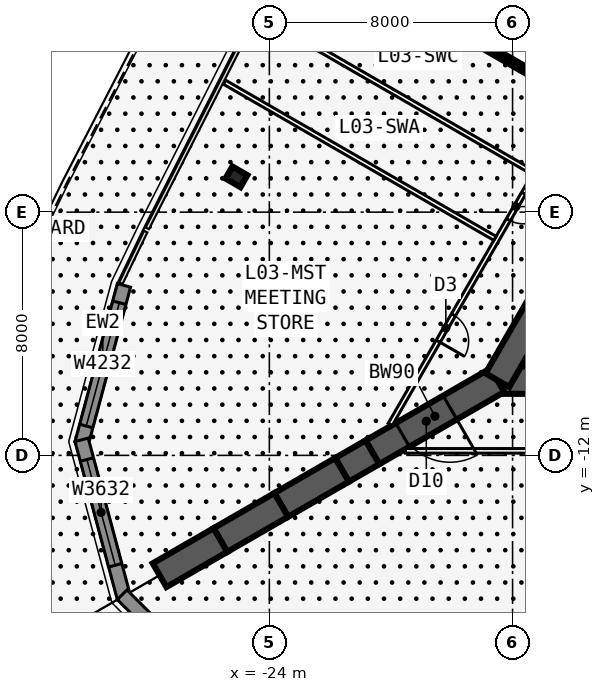
"""IFC4 building model, lengths in metres.
Left out: names, types, materials, properties, quantities, classifications, styles, units other than length and angle.
Written with IfcOpenShell. Run it as: python <this file> out.ifc"""

import sys

from ifc_helpers import new_model, si_unit, direction, frame, frame_2d, origin, origin_2d, place, context, subcontext, project, spatial, rectangle, i_section, extrude, element, fill, save


model = new_model("IFC4")
c1 = context("Model", 3, precision=1e-05, world=origin(), true_north=direction((0.0, 1.0)))
c2 = subcontext(c1, "Body", "Model", "MODEL_VIEW")
j1 = project(units=[si_unit("LENGTHUNIT", "METRE"), si_unit("PLANEANGLEUNIT", "RADIAN")], contexts=[c1])
p1 = place(None, origin())
s1 = spatial("IfcSite", under=j1, at=p1, CompositionType="ELEMENT")
p2 = place(p1, origin())
s2 = spatial("IfcBuilding", under=s1, at=p2, CompositionType="ELEMENT")
p3 = place(p2, frame((0.0, 0.0, 17.5)))
s3 = spatial("IfcBuildingStorey", under=s2, at=p3, CompositionType="ELEMENT", Elevation=17.5)
p4 = place(p3, frame((-16.5, -9.526, 0.0), z_axis=(0.0, 0.0, 1.0), x_axis=(1.0, 0.0, 0.0)))
e1 = element("IfcWall", 1, at=p4, inside=s3, PredefinedType="SHEAR", context=c2, shape_type="SweptSolid", body=[
    extrude(rectangle(XDim=33.0, YDim=0.9, at=frame_2d((16.5, 0.0))), origin(), (0.0, 0.0, 1.0), 5.0),
])
p5 = place(p4, frame((14.05, 0.0, 0.0)))
e2 = element("IfcOpeningElement", 2, at=p5, cuts=e1, PredefinedType="OPENING", context=c2, shape_type="SweptSolid", body=[
    extrude(rectangle(XDim=1.8, YDim=2.13, at=frame_2d((0.9, 1.065))), frame((0.0, 0.46, 0.0), z_axis=(0.0, -1.0, 0.0), x_axis=(1.0, 0.0, 0.0)), (0.0, 0.0, 1.0), 0.92),
])
p6 = place(p3, frame((0.0, 19.052, 0.0), z_axis=(0.0, 0.0, 1.0), x_axis=(-0.499999749417, -0.866025548458, 0.0)))
e3 = element("IfcWall", 3, at=p6, inside=s3, PredefinedType="SHEAR", context=c2, shape_type="SweptSolid", body=[
    extrude(rectangle(XDim=33.0, YDim=0.9, at=frame_2d((16.5, 0.0))), origin(), (0.0, 0.0, 1.0), 5.0),
])
p7 = place(p6, frame((14.15, 0.0, 0.0)))
e4 = element("IfcOpeningElement", 4, at=p7, cuts=e3, PredefinedType="OPENING", context=c2, shape_type="SweptSolid", body=[
    extrude(rectangle(XDim=1.8, YDim=2.13, at=frame_2d((0.9, 1.065))), frame((0.0, 0.46, 0.0), z_axis=(0.0, -1.0, 0.0), x_axis=(1.0, 0.0, 0.0)), (0.0, 0.0, 1.0), 0.92),
])
p8 = place(p6, frame((12.6, 0.0, 0.0)))
e5 = element("IfcOpeningElement", 5, at=p8, cuts=e3, PredefinedType="OPENING", context=c2, shape_type="SweptSolid", body=[
    extrude(rectangle(XDim=1.0, YDim=2.13, at=frame_2d((0.5, 1.065))), frame((0.0, 0.46, 0.0), z_axis=(0.0, -1.0, 0.0), x_axis=(1.0, 0.0, 0.0)), (0.0, 0.0, 1.0), 0.92),
])
p9 = place(p3, frame((-16.5, -9.526, 0.0), z_axis=(0.0, 0.0, 1.0), x_axis=(-0.866031398331, -0.499989616998, 0.0)))
e6 = element("IfcWall", 6, at=p9, inside=s3, PredefinedType="SHEAR", context=c2, shape_type="SweptSolid", body=[
    extrude(rectangle(XDim=4.746, YDim=0.9, at=frame_2d((2.373, 0.0))), origin(), (0.0, 0.0, 1.0), 5.0),
])
p10 = place(p9, frame((1.8, 0.0, 0.0)))
e7 = element("IfcOpeningElement", 7, at=p10, cuts=e6, PredefinedType="OPENING", context=c2, shape_type="SweptSolid", body=[
    extrude(rectangle(XDim=1.8, YDim=2.13, at=frame_2d((0.9, 1.065))), frame((0.0, 0.46, 0.0), z_axis=(0.0, -1.0, 0.0), x_axis=(1.0, 0.0, 0.0)), (0.0, 0.0, 1.0), 0.92),
])
p11 = place(p3, frame((-20.61, -11.899, 0.0), z_axis=(0.0, 0.0, 1.0), x_axis=(-0.866009537788, -0.500027479704, 0.0)))
e8 = element("IfcWall", 8, at=p11, inside=s3, PredefinedType="SHEAR", context=c2, shape_type="SweptSolid", body=[
    extrude(rectangle(XDim=1.155, YDim=0.9, at=frame_2d((0.577, 0.0))), origin(), (0.0, 0.0, 1.0), 5.0),
])
for number, where, z_axis, x_axis in (
    (9, (-21.61, -12.477, 0.0), (0.0, 0.0, 1.0), (-0.866, -0.5, 0.0)),
    (10, (-23.61, -13.631, 0.0), (0.0, 0.0, 1.0), (-0.866, -0.5, 0.0)),
    (11, (-25.61, -14.786, 0.0), (0.0, 0.0, 1.0), (-0.866, -0.5, 0.0)),
):
    element("IfcWall", number, at=place(p3, frame(where, z_axis=z_axis, x_axis=x_axis)), inside=s3, PredefinedType="SHEAR", context=c2, shape_type="SweptSolid", body=[
        extrude(rectangle(XDim=2.309, YDim=0.9, at=frame_2d((1.155, 0.0))), origin(), (0.0, 0.0, 1.0), 5.0),
    ])
p12 = place(p3, frame((-25.083, -2.839, 0.0), z_axis=(0.0, 0.0, 1.0), x_axis=(-0.5, -0.866025403784, 0.0)))
e12 = element("IfcColumn", 12, at=p12, inside=s3, PredefinedType="COLUMN", context=c2, shape_type="SweptSolid", body=[
    extrude(i_section(OverallWidth=0.455, OverallDepth=0.569, WebThickness=0.078, FlangeThickness=0.125, at=origin_2d()), origin(), (0.0, 0.0, 1.0), 5.0),
])
p13 = place(p3, frame((-28.783, -6.409, 0.0), z_axis=(0.0, 0.0, 1.0), x_axis=(-0.258829095032, -0.965923133363, 0.0)))
e13 = element("IfcWall", 13, at=p13, inside=s3, PredefinedType="SOLIDWALL", context=c2, shape_type="SweptSolid", body=[
    extrude(rectangle(XDim=5.379, YDim=0.45, at=frame_2d((2.69, 0.0))), origin(), (0.0, 0.0, 1.0), 4.75),
])
p14 = place(p13, frame((0.59, 0.0, 0.6)))
e14 = element("IfcOpeningElement", 14, at=p14, cuts=e13, PredefinedType="OPENING", context=c2, shape_type="SweptSolid", body=[
    extrude(rectangle(XDim=4.2, YDim=3.2, at=frame_2d((2.1, 1.6))), frame((0.0, 0.235, 0.0), z_axis=(0.0, -1.0, 0.0), x_axis=(1.0, 0.0, 0.0)), (0.0, 0.0, 1.0), 0.47),
])
p15 = place(p3, frame((-30.175, -11.489, 0.0), z_axis=(0.0, 0.0, 1.0), x_axis=(0.258817748921, -0.965926173599, 0.0)))
e15 = element("IfcWall", 15, at=p15, inside=s3, PredefinedType="SOLIDWALL", context=c2, shape_type="SweptSolid", body=[
    extrude(rectangle(XDim=5.38, YDim=0.45, at=frame_2d((2.69, 0.0))), origin(), (0.0, 0.0, 1.0), 4.75),
])
p16 = place(p15, frame((0.671, 0.0, 0.6)))
e16 = element("IfcOpeningElement", 16, at=p16, cuts=e15, PredefinedType="OPENING", context=c2, shape_type="SweptSolid", body=[
    extrude(rectangle(XDim=3.6, YDim=3.2, at=frame_2d((1.8, 1.6))), frame((0.0, 0.235, 0.0), z_axis=(0.0, -1.0, 0.0), x_axis=(1.0, 0.0, 0.0)), (0.0, 0.0, 1.0), 0.47),
])
p17 = place(p3, frame((-28.841, -16.584, 0.0), z_axis=(0.0, 0.0, 1.0), x_axis=(0.707084088779, -0.707129472866, 0.0)))
e17 = element("IfcWall", 17, at=p17, inside=s3, PredefinedType="SOLIDWALL", context=c2, shape_type="SweptSolid", body=[
    extrude(rectangle(XDim=5.379, YDim=0.45, at=frame_2d((2.69, 0.0))), origin(), (0.0, 0.0, 1.0), 4.75),
])
p18 = place(p17, frame((1.108, 0.0, 0.6)))
e18 = element("IfcOpeningElement", 18, at=p18, cuts=e17, PredefinedType="OPENING", context=c2, shape_type="SweptSolid", body=[
    extrude(rectangle(XDim=3.6, YDim=3.2, at=frame_2d((1.8, 1.6))), frame((0.0, 0.235, 0.0), z_axis=(0.0, -1.0, 0.0), x_axis=(1.0, 0.0, 0.0)), (0.0, 0.0, 1.0), 0.47),
])
p19 = place(p3, frame((-19.527, -11.851, 0.0), z_axis=(0.0, 0.0, 1.0), x_axis=(1.0, 0.0, 0.0)))
e19 = element("IfcWall", 19, at=p19, inside=s3, PredefinedType="PARTITIONING", context=c2, shape_type="SweptSolid", body=[
    extrude(rectangle(XDim=39.054, YDim=0.15, at=frame_2d((19.527, 0.0))), origin(), (0.0, 0.0, 1.0), 4.75),
])
p20 = place(p19, frame((6.013, 0.0, 0.0)))
e20 = element("IfcOpeningElement", 20, at=p20, cuts=e19, PredefinedType="OPENING", context=c2, shape_type="SweptSolid", body=[
    extrude(rectangle(XDim=1.8, YDim=2.13, at=frame_2d((0.9, 1.065))), frame((0.0, 0.085, 0.0), z_axis=(0.0, -1.0, 0.0), x_axis=(1.0, 0.0, 0.0)), (0.0, 0.0, 1.0), 0.17),
])
p21 = place(p19, frame((16.627, 0.0, 0.0)))
e21 = element("IfcOpeningElement", 21, at=p21, cuts=e19, PredefinedType="OPENING", context=c2, shape_type="SweptSolid", body=[
    extrude(rectangle(XDim=1.8, YDim=2.13, at=frame_2d((0.9, 1.065))), frame((0.0, 0.085, 0.0), z_axis=(0.0, -1.0, 0.0), x_axis=(1.0, 0.0, 0.0)), (0.0, 0.0, 1.0), 0.17),
])
p22 = place(p19, frame((23.227, 0.0, 0.0)))
e22 = element("IfcOpeningElement", 22, at=p22, cuts=e19, PredefinedType="OPENING", context=c2, shape_type="SweptSolid", body=[
    extrude(rectangle(XDim=1.8, YDim=2.13, at=frame_2d((0.9, 1.065))), frame((0.0, 0.085, 0.0), z_axis=(0.0, -1.0, 0.0), x_axis=(1.0, 0.0, 0.0)), (0.0, 0.0, 1.0), 0.17),
])
p23 = place(p19, frame((31.841, 0.0, 0.0)))
e23 = element("IfcOpeningElement", 23, at=p23, cuts=e19, PredefinedType="OPENING", context=c2, shape_type="SweptSolid", body=[
    extrude(rectangle(XDim=1.8, YDim=2.13, at=frame_2d((0.9, 1.065))), frame((0.0, 0.085, 0.0), z_axis=(0.0, -1.0, 0.0), x_axis=(1.0, 0.0, 0.0)), (0.0, 0.0, 1.0), 0.17),
])
p24 = place(p3, frame((-0.5, 22.836, 0.0), z_axis=(0.0, 0.0, 1.0), x_axis=(-0.500001677587, -0.866024435227, 0.0)))
e24 = element("IfcWall", 24, at=p24, inside=s3, PredefinedType="PARTITIONING", context=c2, shape_type="SweptSolid", body=[
    extrude(rectangle(XDim=39.054, YDim=0.15, at=frame_2d((19.527, 0.0))), origin(), (0.0, 0.0, 1.0), 4.75),
])
p25 = place(p24, frame((10.414, 0.0, 0.0)))
e25 = element("IfcOpeningElement", 25, at=p25, cuts=e24, PredefinedType="OPENING", context=c2, shape_type="SweptSolid", body=[
    extrude(rectangle(XDim=1.0, YDim=2.13, at=frame_2d((0.5, 1.065))), frame((0.0, 0.085, 0.0), z_axis=(0.0, -1.0, 0.0), x_axis=(1.0, 0.0, 0.0)), (0.0, 0.0, 1.0), 0.17),
])
p26 = place(p24, frame((23.227, 0.0, 0.0)))
e26 = element("IfcOpeningElement", 26, at=p26, cuts=e24, PredefinedType="OPENING", context=c2, shape_type="SweptSolid", body=[
    extrude(rectangle(XDim=1.8, YDim=2.13, at=frame_2d((0.9, 1.065))), frame((0.0, 0.085, 0.0), z_axis=(0.0, -1.0, 0.0), x_axis=(1.0, 0.0, 0.0)), (0.0, 0.0, 1.0), 0.17),
])
p27 = place(p24, frame((27.627, 0.0, 0.0)))
e27 = element("IfcOpeningElement", 27, at=p27, cuts=e24, PredefinedType="OPENING", context=c2, shape_type="SweptSolid", body=[
    extrude(rectangle(XDim=1.0, YDim=2.13, at=frame_2d((0.5, 1.065))), frame((0.0, 0.085, 0.0), z_axis=(0.0, -1.0, 0.0), x_axis=(1.0, 0.0, 0.0)), (0.0, 0.0, 1.0), 0.17),
])
p28 = place(p24, frame((30.277, 0.0, 0.0)))
e28 = element("IfcOpeningElement", 28, at=p28, cuts=e24, PredefinedType="OPENING", context=c2, shape_type="SweptSolid", body=[
    extrude(rectangle(XDim=1.0, YDim=2.13, at=frame_2d((0.5, 1.065))), frame((0.0, 0.085, 0.0), z_axis=(0.0, -1.0, 0.0), x_axis=(1.0, 0.0, 0.0)), (0.0, 0.0, 1.0), 0.17),
])
p29 = place(p24, frame((34.89, 0.0, 0.0)))
e29 = element("IfcOpeningElement", 29, at=p29, cuts=e24, PredefinedType="OPENING", context=c2, shape_type="SweptSolid", body=[
    extrude(rectangle(XDim=1.0, YDim=2.13, at=frame_2d((0.5, 1.065))), frame((0.0, 0.085, 0.0), z_axis=(0.0, -1.0, 0.0), x_axis=(1.0, 0.0, 0.0)), (0.0, 0.0, 1.0), 0.17),
])
p30 = place(p3, frame((-13.928, -0.272, 0.0), z_axis=(0.0, 0.0, 1.0), x_axis=(-0.866031513124, 0.499989418164, 0.0)))
e30 = element("IfcWall", 30, at=p30, inside=s3, PredefinedType="SHEAR", context=c2, shape_type="SweptSolid", body=[
    extrude(rectangle(XDim=10.502, YDim=0.2, at=frame_2d((5.251, 0.0))), origin(), (0.0, 0.0, 1.0), 5.0),
])
p31 = place(p3, frame((-15.329, -2.697, 0.0), z_axis=(0.0, 0.0, 1.0), x_axis=(-0.866025500669, 0.49999983219, 0.0)))
e31 = element("IfcWall", 31, at=p31, inside=s3, PredefinedType="PARTITIONING", context=c2, shape_type="SweptSolid", body=[
    extrude(rectangle(XDim=10.413, YDim=0.15, at=frame_2d((5.206, 0.0))), origin(), (0.0, 0.0, 1.0), 3.808),
])
p32 = place(p3, frame((-16.579, -4.862, 0.0), z_axis=(0.0, 0.0, 1.0), x_axis=(-0.866019836563, 0.500009642587, 0.0)))
e32 = element("IfcWall", 32, at=p32, inside=s3, PredefinedType="PARTITIONING", context=c2, shape_type="SweptSolid", body=[
    extrude(rectangle(XDim=10.278, YDim=0.15, at=frame_2d((5.139, 0.0))), origin(), (0.0, 0.0, 1.0), 4.75),
])
p33 = place(p14, origin())
e33 = element("IfcWindow", 33, at=p33, inside=s3, PartitioningType="SINGLE_PANEL", PredefinedType="WINDOW", context=c2, shape_type="SweptSolid", body=[
    extrude(rectangle(XDim=4.2, YDim=3.2, at=frame_2d((2.1, 1.6))), frame((0.0, 0.03, 0.0), z_axis=(0.0, -1.0, 0.0), x_axis=(1.0, 0.0, 0.0)), (0.0, 0.0, 1.0), 0.06),
])
fill(e14, e33)
p34 = place(p16, origin())
e34 = element("IfcWindow", 34, at=p34, inside=s3, PartitioningType="SINGLE_PANEL", PredefinedType="WINDOW", context=c2, shape_type="SweptSolid", body=[
    extrude(rectangle(XDim=3.6, YDim=3.2, at=frame_2d((1.8, 1.6))), frame((0.0, 0.03, 0.0), z_axis=(0.0, -1.0, 0.0), x_axis=(1.0, 0.0, 0.0)), (0.0, 0.0, 1.0), 0.06),
])
fill(e16, e34)
p35 = place(p28, origin())
e35 = element("IfcDoor", 35, at=p35, inside=s3, OperationType="SINGLE_SWING_LEFT", PredefinedType="DOOR", context=c2, shape_type="SweptSolid", body=[
    extrude(rectangle(XDim=1.0, YDim=2.13, at=frame_2d((0.5, 1.065))), frame((0.0, 0.025, 0.0), z_axis=(0.0, -1.0, 0.0), x_axis=(1.0, 0.0, 0.0)), (0.0, 0.0, 1.0), 0.05),
])
fill(e28, e35)
p36 = place(p29, origin())
e36 = element("IfcDoor", 36, at=p36, inside=s3, OperationType="SINGLE_SWING_RIGHT", PredefinedType="DOOR", context=c2, shape_type="SweptSolid", body=[
    extrude(rectangle(XDim=1.0, YDim=2.13, at=frame_2d((0.5, 1.065))), frame((0.0, 0.025, 0.0), z_axis=(0.0, -1.0, 0.0), x_axis=(1.0, 0.0, 0.0)), (0.0, 0.0, 1.0), 0.05),
])
fill(e29, e36)
p37 = place(p10, origin())
e37 = element("IfcDoor", 37, at=p37, inside=s3, OperationType="DOUBLE_DOOR_DOUBLE_SWING", PredefinedType="DOOR", context=c2, shape_type="SweptSolid", body=[
    extrude(rectangle(XDim=1.8, YDim=2.13, at=frame_2d((0.9, 1.065))), frame((0.0, 0.025, 0.0), z_axis=(0.0, -1.0, 0.0), x_axis=(1.0, 0.0, 0.0)), (0.0, 0.0, 1.0), 0.05),
])
fill(e7, e37)
save(model, sys.argv[1])
